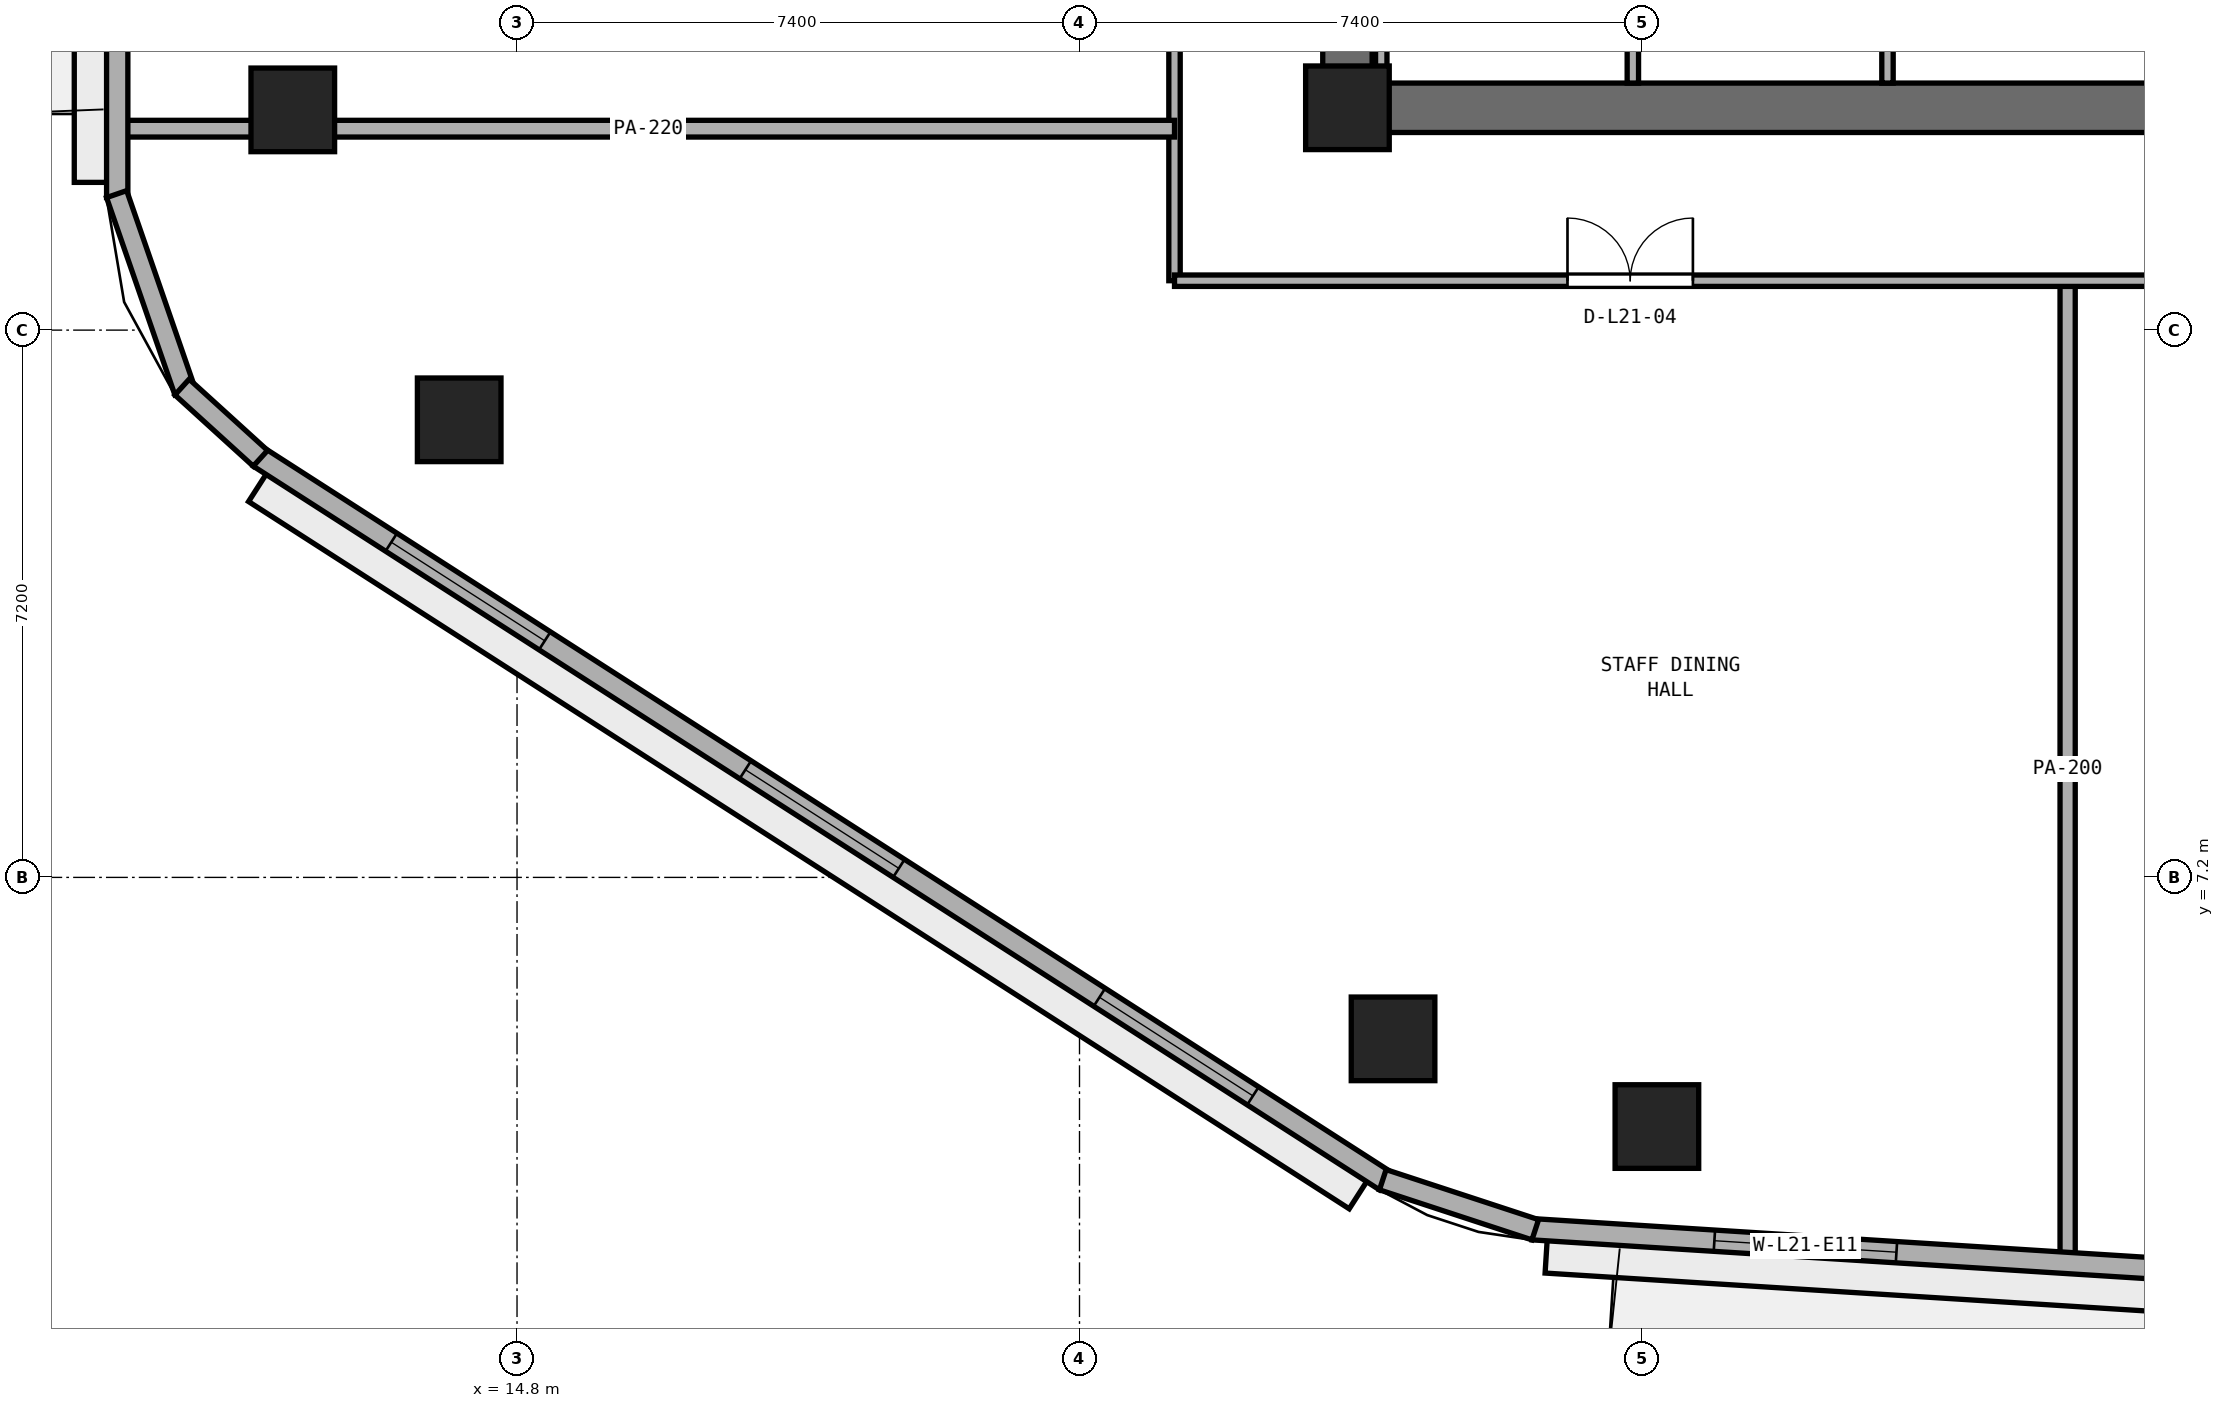
"""IFC4 building model, lengths in metres.
Left out: names, types, materials, properties, quantities, classifications, styles, units other than length and angle.
Written with IfcOpenShell. Run it as: python <this file> out.ifc"""

import sys

from ifc_helpers import new_model, si_unit, direction, frame, frame_2d, origin, origin_2d, place, context, subcontext, project, spatial, rectangle, extrude, element, fill, save


model = new_model("IFC4")
c1 = context("Model", 3, precision=1e-05, world=origin(), true_north=direction((0.0, 1.0)))
c2 = subcontext(c1, "Body", "Model", "MODEL_VIEW")
j1 = project(units=[si_unit("LENGTHUNIT", "METRE"), si_unit("PLANEANGLEUNIT", "RADIAN")], contexts=[c1])
p1 = place(None, origin())
s1 = spatial("IfcSite", under=j1, at=p1, CompositionType="ELEMENT")
p2 = place(p1, origin())
s2 = spatial("IfcBuilding", under=s1, at=p2, CompositionType="ELEMENT")
p3 = place(p2, frame((0.0, 0.0, 85.8)))
s3 = spatial("IfcBuildingStorey", under=s2, at=p3, CompositionType="ELEMENT", Elevation=85.8)
p4 = place(p3, frame((25.4, 17.325, 0.0), z_axis=(0.0, 0.0, 1.0), x_axis=(1.0, 0.0, 0.0)))
e1 = element("IfcWall", 1, at=p4, inside=s3, PredefinedType="SHEAR", context=c2, shape_type="SweptSolid", body=[
    extrude(rectangle(XDim=23.2, YDim=0.65, at=frame_2d((11.6, 0.0))), origin(), (0.0, 0.0, 1.0), 3.525),
])
p5 = place(p3, frame((25.725, 17.65, 0.0), z_axis=(0.0, 0.0, 1.0), x_axis=(0.0, 1.0, 0.0)))
e2 = element("IfcWall", 2, at=p5, inside=s3, PredefinedType="SHEAR", context=c2, shape_type="SweptSolid", body=[
    extrude(rectangle(XDim=15.1, YDim=0.65, at=frame_2d((7.55, 0.0))), origin(), (0.0, 0.0, 1.0), 3.525),
])
p6 = place(p5, frame((6.8, 0.0, 0.0)))
e3 = element("IfcOpeningElement", 3, at=p6, cuts=e2, PredefinedType="OPENING", context=c2, shape_type="SweptSolid", body=[
    extrude(rectangle(XDim=1.5, YDim=2.15, at=frame_2d((0.75, 1.075))), frame((0.0, 0.335, 0.0), z_axis=(0.0, -1.0, 0.0), x_axis=(1.0, 0.0, 0.0)), (0.0, 0.0, 1.0), 0.67),
])
p7 = place(p3, frame((25.725, 17.325, 0.0), z_axis=(0.0, 0.0, 1.0), x_axis=(1.0, 0.0, 0.0)))
e4 = element("IfcColumn", 4, at=p7, inside=s3, PredefinedType="PILASTER", context=c2, shape_type="SweptSolid", body=[
    extrude(rectangle(XDim=1.1, YDim=1.1, at=origin_2d()), origin(), (0.0, 0.0, 1.0), 3.8),
])
for number, where, z_axis, x_axis in (
    (5, (29.796, 3.922, 0.0), (0.0, 0.0, 1.0), (1.0, 0.0, 0.0)),
    (6, (11.85, 17.298, 0.0), (0.0, 0.0, 1.0), (1.0, 0.0, 0.0)),
    (7, (14.039, 13.22, 0.0), (0.0, 0.0, 1.0), (1.0, 0.0, 0.0)),
    (8, (26.325, 5.076, 0.0), (0.0, 0.0, 1.0), (1.0, 0.0, 0.0)),
):
    element("IfcColumn", number, at=place(p3, frame(where, z_axis=z_axis, x_axis=x_axis)), inside=s3, PredefinedType="COLUMN", context=c2, shape_type="SweptSolid", body=[
        extrude(rectangle(XDim=1.1, YDim=1.1, at=origin_2d()), origin(), (0.0, 0.0, 1.0), 3.8),
    ])
for number, where, z_axis, x_axis in (
    (9, (26.17, 17.65, 0.0), (0.0, 0.0, 1.0), (0.0, 1.0, 0.0)),
    (10, (29.48, 17.65, 0.0), (0.0, 0.0, 1.0), (0.0, 1.0, 0.0)),
    (11, (32.83, 17.65, 0.0), (0.0, 0.0, 1.0), (0.0, 1.0, 0.0)),
):
    element("IfcWall", number, at=place(p3, frame(where, z_axis=z_axis, x_axis=x_axis)), inside=s3, PredefinedType="PARTITIONING", context=c2, shape_type="SweptSolid", body=[
        extrude(rectangle(XDim=2.1, YDim=0.15, at=frame_2d((1.05, 0.0))), origin(), (0.0, 0.0, 1.0), 3.525),
    ])
p8 = place(p3, frame((35.2, 2.192, 0.0), z_axis=(0.0, 0.0, 1.0), x_axis=(0.0, 1.0, 0.0)))
e12 = element("IfcWall", 12, at=p8, inside=s3, PredefinedType="PARTITIONING", context=c2, shape_type="SweptSolid", body=[
    extrude(rectangle(XDim=12.858, YDim=0.2, at=frame_2d((6.429, 0.0))), origin(), (0.0, 0.0, 1.0), 3.525),
])
p9 = place(p3, frame((23.45, 15.05, 0.0), z_axis=(0.0, 0.0, 1.0), x_axis=(0.0, 1.0, 0.0)))
e13 = element("IfcWall", 13, at=p9, inside=s3, PredefinedType="PARTITIONING", context=c2, shape_type="SweptSolid", body=[
    extrude(rectangle(XDim=20.3, YDim=0.15, at=frame_2d((10.15, 0.0))), origin(), (0.0, 0.0, 1.0), 3.525),
])
p10 = place(p9, frame((8.025, 0.0, 0.0)))
e14 = element("IfcOpeningElement", 14, at=p10, cuts=e13, PredefinedType="OPENING", context=c2, shape_type="SweptSolid", body=[
    extrude(rectangle(XDim=0.9, YDim=2.1, at=frame_2d((0.45, 1.05))), frame((0.0, 0.085, 0.0), z_axis=(0.0, -1.0, 0.0), x_axis=(1.0, 0.0, 0.0)), (0.0, 0.0, 1.0), 0.17),
])
p11 = place(p9, frame((16.175, 0.0, 0.0)))
e15 = element("IfcOpeningElement", 15, at=p11, cuts=e13, PredefinedType="OPENING", context=c2, shape_type="SweptSolid", body=[
    extrude(rectangle(XDim=0.9, YDim=2.1, at=frame_2d((0.45, 1.05))), frame((0.0, 0.085, 0.0), z_axis=(0.0, -1.0, 0.0), x_axis=(1.0, 0.0, 0.0)), (0.0, 0.0, 1.0), 0.17),
])
p12 = place(p3, frame((23.45, 15.05, 0.0), z_axis=(0.0, 0.0, 1.0), x_axis=(1.0, 0.0, 0.0)))
e16 = element("IfcWall", 16, at=p12, inside=s3, PredefinedType="PARTITIONING", context=c2, shape_type="SweptSolid", body=[
    extrude(rectangle(XDim=27.1, YDim=0.15, at=frame_2d((13.55, 0.0))), origin(), (0.0, 0.0, 1.0), 3.525),
])
p13 = place(p12, frame((5.17, 0.0, 0.0)))
e17 = element("IfcOpeningElement", 17, at=p13, cuts=e16, PredefinedType="OPENING", context=c2, shape_type="SweptSolid", body=[
    extrude(rectangle(XDim=1.65, YDim=2.15, at=frame_2d((0.825, 1.075))), frame((0.0, 0.085, 0.0), z_axis=(0.0, -1.0, 0.0), x_axis=(1.0, 0.0, 0.0)), (0.0, 0.0, 1.0), 0.17),
])
p14 = place(p12, frame((18.855, 0.0, 0.0)))
e18 = element("IfcOpeningElement", 18, at=p14, cuts=e16, PredefinedType="OPENING", context=c2, shape_type="SweptSolid", body=[
    extrude(rectangle(XDim=0.9, YDim=2.1, at=frame_2d((0.45, 1.05))), frame((0.0, 0.085, 0.0), z_axis=(0.0, -1.0, 0.0), x_axis=(1.0, 0.0, 0.0)), (0.0, 0.0, 1.0), 0.17),
])
p15 = place(p3, frame((9.605, 17.05, 0.0), z_axis=(0.0, 0.0, 1.0), x_axis=(1.0, 0.0, 0.0)))
e19 = element("IfcWall", 19, at=p15, inside=s3, PredefinedType="PARTITIONING", context=c2, shape_type="SweptSolid", body=[
    extrude(rectangle(XDim=13.845, YDim=0.22, at=frame_2d((6.922, 0.0))), origin(), (0.0, 0.0, 1.0), 2.908),
])
p16 = place(p3, frame((28.161, 2.571, 0.0), z_axis=(0.0, 0.0, 1.0), x_axis=(0.998017288298, -0.06294038654, 0.0)))
e20 = element("IfcWall", 20, at=p16, inside=s3, PredefinedType="STANDARD", context=c2, shape_type="SweptSolid", body=[
    extrude(rectangle(XDim=19.577, YDim=0.28, at=frame_2d((9.789, 0.0))), origin(), (0.0, 0.0, 1.0), 3.525),
])
p17 = place(p16, frame((9.239, 0.0, 0.0)))
e21 = element("IfcOpeningElement", 21, at=p17, cuts=e20, PredefinedType="OPENING", context=c2, shape_type="SweptSolid", body=[
    extrude(rectangle(XDim=1.1, YDim=2.2, at=frame_2d((0.55, 1.1))), frame((0.0, 0.15, 0.0), z_axis=(0.0, -1.0, 0.0), x_axis=(1.0, 0.0, 0.0)), (0.0, 0.0, 1.0), 0.3),
])
p18 = place(p16, frame((2.396, 0.0, 0.9)))
e22 = element("IfcOpeningElement", 22, at=p18, cuts=e20, PredefinedType="OPENING", context=c2, shape_type="SweptSolid", body=[
    extrude(rectangle(XDim=2.4, YDim=1.75, at=frame_2d((1.2, 0.875))), frame((0.0, 0.15, 0.0), z_axis=(0.0, -1.0, 0.0), x_axis=(1.0, 0.0, 0.0)), (0.0, 0.0, 1.0), 0.3),
])
p19 = place(p16, frame((14.781, 0.0, 0.9)))
e23 = element("IfcOpeningElement", 23, at=p19, cuts=e20, PredefinedType="OPENING", context=c2, shape_type="SweptSolid", body=[
    extrude(rectangle(XDim=2.4, YDim=1.75, at=frame_2d((1.2, 0.875))), frame((0.0, 0.15, 0.0), z_axis=(0.0, -1.0, 0.0), x_axis=(1.0, 0.0, 0.0)), (0.0, 0.0, 1.0), 0.3),
])
p20 = place(p3, frame((9.54, 33.444, 0.0), z_axis=(0.0, 0.0, 1.0), x_axis=(0.0, -1.0, 0.0)))
e24 = element("IfcWall", 24, at=p20, inside=s3, PredefinedType="STANDARD", context=c2, shape_type="SweptSolid", body=[
    extrude(rectangle(XDim=17.301, YDim=0.28, at=frame_2d((8.65, 0.0))), origin(), (0.0, 0.0, 1.0), 3.525),
])
p21 = place(p20, frame((8.1, 0.0, 0.0)))
e25 = element("IfcOpeningElement", 25, at=p21, cuts=e24, PredefinedType="OPENING", context=c2, shape_type="SweptSolid", body=[
    extrude(rectangle(XDim=1.1, YDim=2.2, at=frame_2d((0.55, 1.1))), frame((0.0, 0.15, 0.0), z_axis=(0.0, -1.0, 0.0), x_axis=(1.0, 0.0, 0.0)), (0.0, 0.0, 1.0), 0.3),
])
p22 = place(p20, frame((12.884, 0.0, 0.9)))
e26 = element("IfcOpeningElement", 26, at=p22, cuts=e24, PredefinedType="OPENING", context=c2, shape_type="SweptSolid", body=[
    extrude(rectangle(XDim=2.4, YDim=1.75, at=frame_2d((1.2, 0.875))), frame((0.0, 0.15, 0.0), z_axis=(0.0, -1.0, 0.0), x_axis=(1.0, 0.0, 0.0)), (0.0, 0.0, 1.0), 0.3),
])
p23 = place(p3, frame((11.405, 12.728, 0.0), z_axis=(0.0, 0.0, 1.0), x_axis=(0.841304564637, -0.540561402175, 0.0)))
e27 = element("IfcWall", 27, at=p23, inside=s3, PredefinedType="STANDARD", context=c2, shape_type="SweptSolid", body=[
    extrude(rectangle(XDim=17.612, YDim=0.28, at=frame_2d((8.806, 0.0))), origin(), (0.0, 0.0, 1.0), 3.525),
])
p24 = place(p23, frame((2.069, 0.0, 0.9)))
e28 = element("IfcOpeningElement", 28, at=p24, cuts=e27, PredefinedType="OPENING", context=c2, shape_type="SweptSolid", body=[
    extrude(rectangle(XDim=2.4, YDim=1.75, at=frame_2d((1.2, 0.875))), frame((0.0, 0.15, 0.0), z_axis=(0.0, -1.0, 0.0), x_axis=(1.0, 0.0, 0.0)), (0.0, 0.0, 1.0), 0.3),
])
p25 = place(p23, frame((7.606, 0.0, 0.9)))
e29 = element("IfcOpeningElement", 29, at=p25, cuts=e27, PredefinedType="OPENING", context=c2, shape_type="SweptSolid", body=[
    extrude(rectangle(XDim=2.4, YDim=1.75, at=frame_2d((1.2, 0.875))), frame((0.0, 0.15, 0.0), z_axis=(0.0, -1.0, 0.0), x_axis=(1.0, 0.0, 0.0)), (0.0, 0.0, 1.0), 0.3),
])
p26 = place(p23, frame((13.143, 0.0, 0.9)))
e30 = element("IfcOpeningElement", 30, at=p26, cuts=e27, PredefinedType="OPENING", context=c2, shape_type="SweptSolid", body=[
    extrude(rectangle(XDim=2.4, YDim=1.75, at=frame_2d((1.2, 0.875))), frame((0.0, 0.15, 0.0), z_axis=(0.0, -1.0, 0.0), x_axis=(1.0, 0.0, 0.0)), (0.0, 0.0, 1.0), 0.3),
])
p27 = place(p3, frame((9.532, 16.189, 0.0), z_axis=(0.0, 0.0, 1.0), x_axis=(0.32708309668, -0.944995580871, 0.0)))
e31 = element("IfcWall", 31, at=p27, inside=s3, PredefinedType="STANDARD", context=c2, shape_type="SweptSolid", body=[
    extrude(rectangle(XDim=2.748, YDim=0.28, at=frame_2d((1.374, 0.0))), origin(), (0.0, 0.0, 1.0), 3.525),
])
p28 = place(p3, frame((10.393, 13.651, 0.0), z_axis=(0.0, 0.0, 1.0), x_axis=(0.74003521851, -0.672568119498, 0.0)))
e32 = element("IfcWall", 32, at=p28, inside=s3, PredefinedType="STANDARD", context=c2, shape_type="SweptSolid", body=[
    extrude(rectangle(XDim=1.393, YDim=0.28, at=frame_2d((0.697, 0.0))), origin(), (0.0, 0.0, 1.0), 3.525),
])
p29 = place(p3, frame((26.19, 3.223, 0.0), z_axis=(0.0, 0.0, 1.0), x_axis=(0.95016442175, -0.311749212734, 0.0)))
e33 = element("IfcWall", 33, at=p29, inside=s3, PredefinedType="STANDARD", context=c2, shape_type="SweptSolid", body=[
    extrude(rectangle(XDim=2.111, YDim=0.28, at=frame_2d((1.056, 0.0))), origin(), (0.0, 0.0, 1.0), 3.525),
])
p30 = place(p13, origin())
e34 = element("IfcDoor", 34, at=p30, inside=s3, OperationType="DOUBLE_DOOR_SINGLE_SWING", PredefinedType="DOOR", context=c2, shape_type="SweptSolid", body=[
    extrude(rectangle(XDim=1.65, YDim=2.15, at=frame_2d((0.825, 1.075))), frame((0.0, 0.025, 0.0), z_axis=(0.0, -1.0, 0.0), x_axis=(1.0, 0.0, 0.0)), (0.0, 0.0, 1.0), 0.05),
])
fill(e17, e34)
p31 = place(p18, origin())
e35 = element("IfcWindow", 35, at=p31, inside=s3, PartitioningType="SINGLE_PANEL", PredefinedType="WINDOW", context=c2, shape_type="SweptSolid", body=[
    extrude(rectangle(XDim=2.4, YDim=1.75, at=frame_2d((1.2, 0.875))), frame((0.0, 0.03, 0.0), z_axis=(0.0, -1.0, 0.0), x_axis=(1.0, 0.0, 0.0)), (0.0, 0.0, 1.0), 0.06),
])
fill(e22, e35)
p32 = place(p24, origin())
e36 = element("IfcWindow", 36, at=p32, inside=s3, PartitioningType="SINGLE_PANEL", PredefinedType="WINDOW", context=c2, shape_type="SweptSolid", body=[
    extrude(rectangle(XDim=2.4, YDim=1.75, at=frame_2d((1.2, 0.875))), frame((0.0, 0.03, 0.0), z_axis=(0.0, -1.0, 0.0), x_axis=(1.0, 0.0, 0.0)), (0.0, 0.0, 1.0), 0.06),
])
fill(e28, e36)
p33 = place(p25, origin())
e37 = element("IfcWindow", 37, at=p33, inside=s3, PartitioningType="SINGLE_PANEL", PredefinedType="WINDOW", context=c2, shape_type="SweptSolid", body=[
    extrude(rectangle(XDim=2.4, YDim=1.75, at=frame_2d((1.2, 0.875))), frame((0.0, 0.03, 0.0), z_axis=(0.0, -1.0, 0.0), x_axis=(1.0, 0.0, 0.0)), (0.0, 0.0, 1.0), 0.06),
])
fill(e29, e37)
p34 = place(p26, origin())
e38 = element("IfcWindow", 38, at=p34, inside=s3, PartitioningType="SINGLE_PANEL", PredefinedType="WINDOW", context=c2, shape_type="SweptSolid", body=[
    extrude(rectangle(XDim=2.4, YDim=1.75, at=frame_2d((1.2, 0.875))), frame((0.0, 0.03, 0.0), z_axis=(0.0, -1.0, 0.0), x_axis=(1.0, 0.0, 0.0)), (0.0, 0.0, 1.0), 0.06),
])
fill(e30, e38)
save(model, sys.argv[1])
